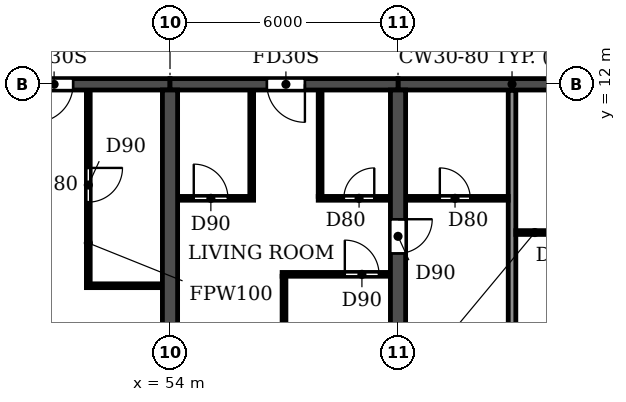
"""IFC4 building model, lengths in metres.
Left out: names, types, materials, properties, quantities, classifications, styles, units other than length and angle.
Written with IfcOpenShell. Run it as: python <this file> out.ifc"""

import sys

from ifc_helpers import new_model, si_unit, direction, frame, frame_2d, origin, place, context, subcontext, project, spatial, rectangle, extrude, element, fill, save


model = new_model("IFC4")
c1 = context("Model", 3, precision=1e-05, world=origin(), true_north=direction((0.0, 1.0)))
c2 = subcontext(c1, "Body", "Model", "MODEL_VIEW")
j1 = project(units=[si_unit("LENGTHUNIT", "METRE"), si_unit("PLANEANGLEUNIT", "RADIAN")], contexts=[c1])
p1 = place(None, origin())
s1 = spatial("IfcSite", under=j1, at=p1, CompositionType="ELEMENT")
p2 = place(p1, origin())
s2 = spatial("IfcBuilding", under=s1, at=p2, CompositionType="ELEMENT")
p3 = place(p2, frame((0.0, 0.0, 63.0)))
s3 = spatial("IfcBuildingStorey", under=s2, at=p3, CompositionType="ELEMENT", Elevation=63.0)
p4 = place(p3, frame((54.0, 0.2, 0.0), z_axis=(0.0, 0.0, 1.0), x_axis=(0.0, 1.0, 0.0)))
e1 = element("IfcWall", 1, at=p4, inside=s3, PredefinedType="SHEAR", context=c2, shape_type="SweptSolid", body=[
    extrude(rectangle(XDim=11.65, YDim=0.4, at=frame_2d((5.825, 0.0))), origin(), (0.0, 0.0, 1.0), 2.95),
])
p5 = place(p3, frame((60.0, 0.2, 0.0), z_axis=(0.0, 0.0, 1.0), x_axis=(0.0, 1.0, 0.0)))
e2 = element("IfcWall", 2, at=p5, inside=s3, PredefinedType="SHEAR", context=c2, shape_type="SweptSolid", body=[
    extrude(rectangle(XDim=11.65, YDim=0.4, at=frame_2d((5.825, 0.0))), origin(), (0.0, 0.0, 1.0), 2.95),
])
p6 = place(p5, frame((7.35, 0.0, 0.0)))
e3 = element("IfcOpeningElement", 3, at=p6, cuts=e2, PredefinedType="OPENING", context=c2, shape_type="SweptSolid", body=[
    extrude(rectangle(XDim=0.9, YDim=2.1, at=frame_2d((0.45, 1.05))), frame((0.0, 0.21, 0.0), z_axis=(0.0, -1.0, 0.0), x_axis=(1.0, 0.0, 0.0)), (0.0, 0.0, 1.0), 0.42),
])
p7 = place(p3, frame((48.0, 12.0, 0.0), z_axis=(0.0, 0.0, 1.0), x_axis=(1.0, 0.0, 0.0)))
e4 = element("IfcWall", 4, at=p7, inside=s3, PredefinedType="SHEAR", context=c2, shape_type="SweptSolid", body=[
    extrude(rectangle(XDim=6.0, YDim=0.3, at=frame_2d((3.0, 0.0))), origin(), (0.0, 0.0, 1.0), 2.35),
])
p8 = place(p7, frame((2.45, 0.0, 0.0)))
e5 = element("IfcOpeningElement", 5, at=p8, cuts=e4, PredefinedType="OPENING", context=c2, shape_type="SweptSolid", body=[
    extrude(rectangle(XDim=1.0, YDim=2.1, at=frame_2d((0.5, 1.05))), frame((0.0, 0.16, 0.0), z_axis=(0.0, -1.0, 0.0), x_axis=(1.0, 0.0, 0.0)), (0.0, 0.0, 1.0), 0.32),
])
p9 = place(p3, frame((54.0, 12.0, 0.0), z_axis=(0.0, 0.0, 1.0), x_axis=(1.0, 0.0, 0.0)))
e6 = element("IfcWall", 6, at=p9, inside=s3, PredefinedType="SHEAR", context=c2, shape_type="SweptSolid", body=[
    extrude(rectangle(XDim=6.0, YDim=0.3, at=frame_2d((3.0, 0.0))), origin(), (0.0, 0.0, 1.0), 2.35),
])
p10 = place(p9, frame((2.55, 0.0, 0.0)))
e7 = element("IfcOpeningElement", 7, at=p10, cuts=e6, PredefinedType="OPENING", context=c2, shape_type="SweptSolid", body=[
    extrude(rectangle(XDim=1.0, YDim=2.1, at=frame_2d((0.5, 1.05))), frame((0.0, 0.16, 0.0), z_axis=(0.0, -1.0, 0.0), x_axis=(1.0, 0.0, 0.0)), (0.0, 0.0, 1.0), 0.32),
])
p11 = place(p3, frame((60.0, 12.0, 0.0), z_axis=(0.0, 0.0, 1.0), x_axis=(1.0, 0.0, 0.0)))
e8 = element("IfcWall", 8, at=p11, inside=s3, PredefinedType="SHEAR", context=c2, shape_type="SweptSolid", body=[
    extrude(rectangle(XDim=6.0, YDim=0.3, at=frame_2d((3.0, 0.0))), origin(), (0.0, 0.0, 1.0), 2.35),
])
p12 = place(p3, frame((63.0, 0.06, 0.0), z_axis=(0.0, 0.0, 1.0), x_axis=(0.0, 1.0, 0.0)))
e9 = element("IfcWall", 9, at=p12, inside=s3, PredefinedType="PARTITIONING", context=c2, shape_type="SweptSolid", body=[
    extrude(rectangle(XDim=11.78, YDim=0.2, at=frame_2d((5.89, 0.0))), origin(), (0.0, 0.0, 1.0), 2.95),
])
p13 = place(p3, frame((51.8, 6.7, 0.0), z_axis=(0.0, 0.0, 1.0), x_axis=(1.0, 0.0, 0.0)))
e10 = element("IfcWall", 10, at=p13, inside=s3, PredefinedType="PARTITIONING", context=c2, shape_type="SweptSolid", body=[
    extrude(rectangle(XDim=1.99, YDim=0.1, at=frame_2d((0.995, 0.0))), origin(), (0.0, 0.0, 1.0), 2.95),
])
p14 = place(p3, frame((56.95, 7.0, 0.0), z_axis=(0.0, 0.0, 1.0), x_axis=(1.0, 0.0, 0.0)))
e11 = element("IfcWall", 11, at=p14, inside=s3, PredefinedType="PARTITIONING", context=c2, shape_type="SweptSolid", body=[
    extrude(rectangle(XDim=2.84, YDim=0.1, at=frame_2d((1.42, 0.0))), origin(), (0.0, 0.0, 1.0), 2.95),
])
p15 = place(p14, frame((1.65, 0.0, 0.0)))
e12 = element("IfcOpeningElement", 12, at=p15, cuts=e11, PredefinedType="OPENING", context=c2, shape_type="SweptSolid", body=[
    extrude(rectangle(XDim=0.9, YDim=2.1, at=frame_2d((0.45, 1.05))), frame((0.0, 0.06, 0.0), z_axis=(0.0, -1.0, 0.0), x_axis=(1.0, 0.0, 0.0)), (0.0, 0.0, 1.0), 0.12),
])
p16 = place(p3, frame((63.1, 8.1, 0.0), z_axis=(0.0, 0.0, 1.0), x_axis=(1.0, 0.0, 0.0)))
e13 = element("IfcWall", 13, at=p16, inside=s3, PredefinedType="PARTITIONING", context=c2, shape_type="SweptSolid", body=[
    extrude(rectangle(XDim=2.69, YDim=0.1, at=frame_2d((1.345, 0.0))), origin(), (0.0, 0.0, 1.0), 2.95),
])
p17 = place(p16, frame((1.0, 0.0, 0.0)))
e14 = element("IfcOpeningElement", 14, at=p17, cuts=e13, PredefinedType="OPENING", context=c2, shape_type="SweptSolid", body=[
    extrude(rectangle(XDim=0.8, YDim=2.1, at=frame_2d((0.4, 1.05))), frame((0.0, 0.06, 0.0), z_axis=(0.0, -1.0, 0.0), x_axis=(1.0, 0.0, 0.0)), (0.0, 0.0, 1.0), 0.12),
])
p18 = place(p3, frame((54.21, 9.0, 0.0), z_axis=(0.0, 0.0, 1.0), x_axis=(1.0, 0.0, 0.0)))
e15 = element("IfcWall", 15, at=p18, inside=s3, PredefinedType="PARTITIONING", context=c2, shape_type="SweptSolid", body=[
    extrude(rectangle(XDim=1.99, YDim=0.1, at=frame_2d((0.995, 0.0))), origin(), (0.0, 0.0, 1.0), 2.95),
])
p19 = place(p18, frame((0.415, 0.0, 0.0)))
e16 = element("IfcOpeningElement", 16, at=p19, cuts=e15, PredefinedType="OPENING", context=c2, shape_type="SweptSolid", body=[
    extrude(rectangle(XDim=0.9, YDim=2.1, at=frame_2d((0.45, 1.05))), frame((0.0, 0.06, 0.0), z_axis=(0.0, -1.0, 0.0), x_axis=(1.0, 0.0, 0.0)), (0.0, 0.0, 1.0), 0.12),
])
p20 = place(p3, frame((57.9, 9.0, 0.0), z_axis=(0.0, 0.0, 1.0), x_axis=(1.0, 0.0, 0.0)))
e17 = element("IfcWall", 17, at=p20, inside=s3, PredefinedType="PARTITIONING", context=c2, shape_type="SweptSolid", body=[
    extrude(rectangle(XDim=1.89, YDim=0.1, at=frame_2d((0.945, 0.0))), origin(), (0.0, 0.0, 1.0), 2.95),
])
p21 = place(p20, frame((0.675, 0.0, 0.0)))
e18 = element("IfcOpeningElement", 18, at=p21, cuts=e17, PredefinedType="OPENING", context=c2, shape_type="SweptSolid", body=[
    extrude(rectangle(XDim=0.8, YDim=2.1, at=frame_2d((0.4, 1.05))), frame((0.0, 0.06, 0.0), z_axis=(0.0, -1.0, 0.0), x_axis=(1.0, 0.0, 0.0)), (0.0, 0.0, 1.0), 0.12),
])
p22 = place(p3, frame((60.21, 9.0, 0.0), z_axis=(0.0, 0.0, 1.0), x_axis=(1.0, 0.0, 0.0)))
e19 = element("IfcWall", 19, at=p22, inside=s3, PredefinedType="PARTITIONING", context=c2, shape_type="SweptSolid", body=[
    extrude(rectangle(XDim=2.69, YDim=0.1, at=frame_2d((1.345, 0.0))), origin(), (0.0, 0.0, 1.0), 2.95),
])
p23 = place(p22, frame((0.89, 0.0, 0.0)))
e20 = element("IfcOpeningElement", 20, at=p23, cuts=e19, PredefinedType="OPENING", context=c2, shape_type="SweptSolid", body=[
    extrude(rectangle(XDim=0.8, YDim=2.1, at=frame_2d((0.4, 1.05))), frame((0.0, 0.06, 0.0), z_axis=(0.0, -1.0, 0.0), x_axis=(1.0, 0.0, 0.0)), (0.0, 0.0, 1.0), 0.12),
])
p24 = place(p3, frame((51.85, 6.75, 0.0), z_axis=(0.0, 0.0, 1.0), x_axis=(0.0, 1.0, 0.0)))
e21 = element("IfcWall", 21, at=p24, inside=s3, PredefinedType="PARTITIONING", context=c2, shape_type="SweptSolid", body=[
    extrude(rectangle(XDim=5.09, YDim=0.1, at=frame_2d((2.545, 0.0))), origin(), (0.0, 0.0, 1.0), 2.95),
])
p25 = place(p24, frame((2.15, 0.0, 0.0)))
e22 = element("IfcOpeningElement", 22, at=p25, cuts=e21, PredefinedType="OPENING", context=c2, shape_type="SweptSolid", body=[
    extrude(rectangle(XDim=0.9, YDim=2.1, at=frame_2d((0.45, 1.05))), frame((0.0, 0.06, 0.0), z_axis=(0.0, -1.0, 0.0), x_axis=(1.0, 0.0, 0.0)), (0.0, 0.0, 1.0), 0.12),
])
p26 = place(p3, frame((56.15, 9.05, 0.0), z_axis=(0.0, 0.0, 1.0), x_axis=(0.0, 1.0, 0.0)))
e23 = element("IfcWall", 23, at=p26, inside=s3, PredefinedType="PARTITIONING", context=c2, shape_type="SweptSolid", body=[
    extrude(rectangle(XDim=2.79, YDim=0.1, at=frame_2d((1.395, 0.0))), origin(), (0.0, 0.0, 1.0), 2.95),
])
p27 = place(p3, frame((57.0, 0.06, 0.0), z_axis=(0.0, 0.0, 1.0), x_axis=(0.0, 1.0, 0.0)))
e24 = element("IfcWall", 24, at=p27, inside=s3, PredefinedType="PARTITIONING", context=c2, shape_type="SweptSolid", body=[
    extrude(rectangle(XDim=6.89, YDim=0.1, at=frame_2d((3.445, 0.0))), origin(), (0.0, 0.0, 1.0), 2.95),
])
p28 = place(p3, frame((57.95, 9.05, 0.0), z_axis=(0.0, 0.0, 1.0), x_axis=(0.0, 1.0, 0.0)))
e25 = element("IfcWall", 25, at=p28, inside=s3, PredefinedType="PARTITIONING", context=c2, shape_type="SweptSolid", body=[
    extrude(rectangle(XDim=2.79, YDim=0.1, at=frame_2d((1.395, 0.0))), origin(), (0.0, 0.0, 1.0), 2.95),
])
p29 = place(p8, frame((1.0, 0.0, 0.0), z_axis=(0.0, 0.0, 1.0), x_axis=(-1.0, 0.0, 0.0)))
e26 = element("IfcDoor", 26, at=p29, inside=s3, OperationType="SINGLE_SWING_RIGHT", PredefinedType="DOOR", context=c2, shape_type="SweptSolid", body=[
    extrude(rectangle(XDim=1.0, YDim=2.1, at=frame_2d((0.5, 1.05))), frame((0.0, 0.025, 0.0), z_axis=(0.0, -1.0, 0.0), x_axis=(1.0, 0.0, 0.0)), (0.0, 0.0, 1.0), 0.05),
])
fill(e5, e26)
p30 = place(p25, frame((0.9, 0.0, 0.0), z_axis=(0.0, 0.0, 1.0), x_axis=(-1.0, 0.0, 0.0)))
e27 = element("IfcDoor", 27, at=p30, inside=s3, OperationType="SINGLE_SWING_LEFT", PredefinedType="DOOR", context=c2, shape_type="SweptSolid", body=[
    extrude(rectangle(XDim=0.9, YDim=2.1, at=frame_2d((0.45, 1.05))), frame((0.0, 0.025, 0.0), z_axis=(0.0, -1.0, 0.0), x_axis=(1.0, 0.0, 0.0)), (0.0, 0.0, 1.0), 0.05),
])
fill(e22, e27)
p31 = place(p23, origin())
e28 = element("IfcDoor", 28, at=p31, inside=s3, OperationType="SINGLE_SWING_LEFT", PredefinedType="DOOR", context=c2, shape_type="SweptSolid", body=[
    extrude(rectangle(XDim=0.8, YDim=2.1, at=frame_2d((0.4, 1.05))), frame((0.0, 0.025, 0.0), z_axis=(0.0, -1.0, 0.0), x_axis=(1.0, 0.0, 0.0)), (0.0, 0.0, 1.0), 0.05),
])
fill(e20, e28)
p32 = place(p19, origin())
e29 = element("IfcDoor", 29, at=p32, inside=s3, OperationType="SINGLE_SWING_LEFT", PredefinedType="DOOR", context=c2, shape_type="SweptSolid", body=[
    extrude(rectangle(XDim=0.9, YDim=2.1, at=frame_2d((0.45, 1.05))), frame((0.0, 0.025, 0.0), z_axis=(0.0, -1.0, 0.0), x_axis=(1.0, 0.0, 0.0)), (0.0, 0.0, 1.0), 0.05),
])
fill(e16, e29)
p33 = place(p10, frame((1.0, 0.0, 0.0), z_axis=(0.0, 0.0, 1.0), x_axis=(-1.0, 0.0, 0.0)))
e30 = element("IfcDoor", 30, at=p33, inside=s3, OperationType="SINGLE_SWING_LEFT", PredefinedType="DOOR", context=c2, shape_type="SweptSolid", body=[
    extrude(rectangle(XDim=1.0, YDim=2.1, at=frame_2d((0.5, 1.05))), frame((0.0, 0.025, 0.0), z_axis=(0.0, -1.0, 0.0), x_axis=(1.0, 0.0, 0.0)), (0.0, 0.0, 1.0), 0.05),
])
fill(e7, e30)
p34 = place(p21, origin())
e31 = element("IfcDoor", 31, at=p34, inside=s3, OperationType="SINGLE_SWING_RIGHT", PredefinedType="DOOR", context=c2, shape_type="SweptSolid", body=[
    extrude(rectangle(XDim=0.8, YDim=2.1, at=frame_2d((0.4, 1.05))), frame((0.0, 0.025, 0.0), z_axis=(0.0, -1.0, 0.0), x_axis=(1.0, 0.0, 0.0)), (0.0, 0.0, 1.0), 0.05),
])
fill(e18, e31)
p35 = place(p15, origin())
e32 = element("IfcDoor", 32, at=p35, inside=s3, OperationType="SINGLE_SWING_LEFT", PredefinedType="DOOR", context=c2, shape_type="SweptSolid", body=[
    extrude(rectangle(XDim=0.9, YDim=2.1, at=frame_2d((0.45, 1.05))), frame((0.0, 0.025, 0.0), z_axis=(0.0, -1.0, 0.0), x_axis=(1.0, 0.0, 0.0)), (0.0, 0.0, 1.0), 0.05),
])
fill(e12, e32)
p36 = place(p6, frame((0.9, 0.0, 0.0), z_axis=(0.0, 0.0, 1.0), x_axis=(-1.0, 0.0, 0.0)))
e33 = element("IfcDoor", 33, at=p36, inside=s3, OperationType="SINGLE_SWING_LEFT", PredefinedType="DOOR", context=c2, shape_type="SweptSolid", body=[
    extrude(rectangle(XDim=0.9, YDim=2.1, at=frame_2d((0.45, 1.05))), frame((0.0, 0.025, 0.0), z_axis=(0.0, -1.0, 0.0), x_axis=(1.0, 0.0, 0.0)), (0.0, 0.0, 1.0), 0.05),
])
fill(e3, e33)
save(model, sys.argv[1])
